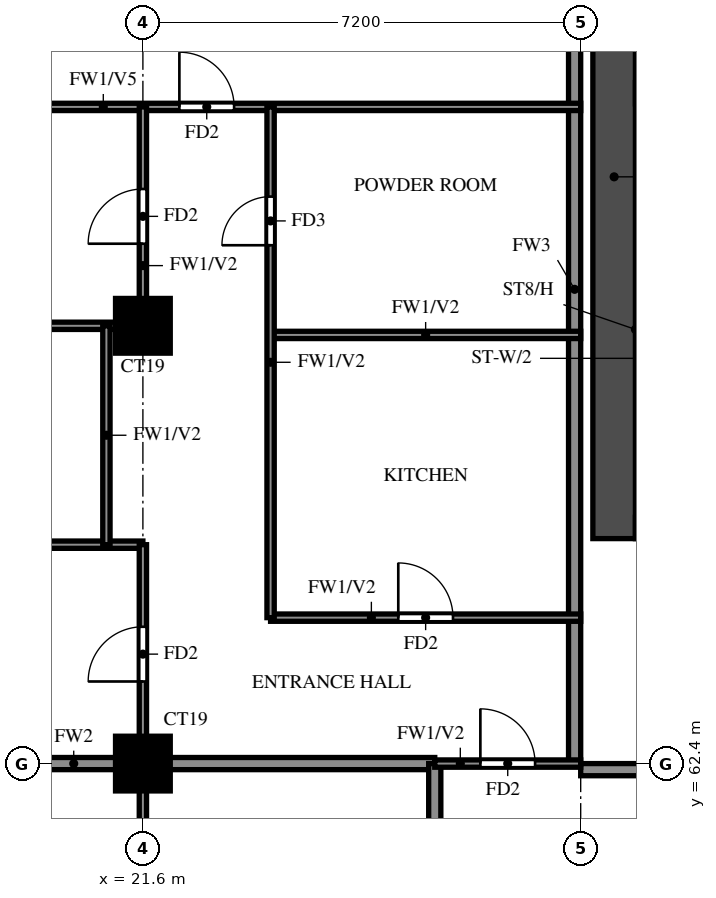
"""IFC4 building model, lengths in metres.
Left out: names, types, materials, properties, quantities, classifications, styles, units other than length and angle.
Written with IfcOpenShell. Run it as: python <this file> out.ifc"""

import sys

from ifc_helpers import new_model, si_unit, direction, frame, frame_2d, origin, origin_2d, place, context, subcontext, project, spatial, rectangle, extrude, source, transform, mapped, element, fill, save


model = new_model("IFC4")
c1 = context("Model", 3, precision=1e-05, world=origin(), true_north=direction((0.0, 1.0)))
c2 = subcontext(c1, "Body", "Model", "MODEL_VIEW")
j1 = project(units=[si_unit("LENGTHUNIT", "METRE"), si_unit("PLANEANGLEUNIT", "RADIAN")], contexts=[c1])
p1 = place(None, origin())
s1 = spatial("IfcSite", under=j1, at=p1, CompositionType="ELEMENT")
p2 = place(p1, origin())
s2 = spatial("IfcBuilding", under=s1, at=p2, CompositionType="ELEMENT")
p3 = place(p2, frame((0.0, 0.0, 199.0)))
s3 = spatial("IfcBuildingStorey", under=s2, at=p3, CompositionType="ELEMENT", Elevation=199.0)
m1 = source(origin(), c2, "Body", "SweptSolid", [
    extrude(rectangle(XDim=0.9, YDim=0.9, at=origin_2d()), origin(), (0.0, 0.0, 1.0), 3.2),
])
for number, where, z_axis, x_axis in (
    (1, (21.6, 62.4, 0.0), (0.0, 0.0, 1.0), (1.0, 0.0, 0.0)),
    (2, (21.6, 69.6, 0.0), (0.0, 0.0, 1.0), (1.0, 0.0, 0.0)),
):
    element("IfcColumn", number, at=place(p3, frame(where, z_axis=z_axis, x_axis=x_axis)), inside=s3, PredefinedType="COLUMN", context=c2, shape_type="MappedRepresentation", body=[
        mapped(m1, transform((0.0, 0.0, 0.0))),
    ])
p4 = place(p3, frame((29.35, 66.1, 0.0), z_axis=(0.0, 0.0, 1.0), x_axis=(0.0, 1.0, 0.0)))
e3 = element("IfcWall", 3, at=p4, inside=s3, PredefinedType="SHEAR", context=c2, shape_type="SweptSolid", body=[
    extrude(rectangle(XDim=11.9, YDim=0.7, at=frame_2d((5.95, 0.0))), origin(), (0.0, 0.0, 1.0), 3.2),
])
p5 = place(p3, frame((28.8, 62.3, 0.0), z_axis=(0.0, 0.0, 1.0), x_axis=(1.0, 0.0, 0.0)))
e4 = element("IfcWall", 4, at=p5, inside=s3, PredefinedType="SOLIDWALL", context=c2, shape_type="SweptSolid", body=[
    extrude(rectangle(XDim=4.8, YDim=0.2, at=frame_2d((2.4, 0.0))), origin(), (0.0, 0.0, 1.0), 3.2),
])
p6 = place(p3, frame((28.7, 62.4, 0.0), z_axis=(0.0, 0.0, 1.0), x_axis=(0.0, 1.0, 0.0)))
e5 = element("IfcWall", 5, at=p6, inside=s3, PredefinedType="SOLIDWALL", context=c2, shape_type="SweptSolid", body=[
    extrude(rectangle(XDim=15.6, YDim=0.2, at=frame_2d((7.8, 0.0))), origin(), (0.0, 0.0, 1.0), 3.2),
])
p7 = place(p3, frame((14.525, 62.4, 0.0), z_axis=(0.0, 0.0, 1.0), x_axis=(1.0, 0.0, 0.0)))
e6 = element("IfcWall", 6, at=p7, inside=s3, PredefinedType="SOLIDWALL", context=c2, shape_type="SweptSolid", body=[
    extrude(rectangle(XDim=11.875, YDim=0.2, at=frame_2d((5.938, 0.0))), origin(), (0.0, 0.0, 1.0), 3.2),
])
p8 = place(p3, frame((26.4, 60.0, 0.0), z_axis=(0.0, 0.0, 1.0), x_axis=(0.0, 1.0, 0.0)))
e7 = element("IfcWall", 7, at=p8, inside=s3, PredefinedType="SOLIDWALL", context=c2, shape_type="SweptSolid", body=[
    extrude(rectangle(XDim=2.4, YDim=0.2, at=frame_2d((1.2, 0.0))), origin(), (0.0, 0.0, 1.0), 3.2),
])
p9 = place(p3, frame((26.4, 62.4, 0.0), z_axis=(0.0, 0.0, 1.0), x_axis=(1.0, 0.0, 0.0)))
e8 = element("IfcWall", 8, at=p9, inside=s3, PredefinedType="PARTITIONING", context=c2, shape_type="SweptSolid", body=[
    extrude(rectangle(XDim=2.4, YDim=0.12, at=frame_2d((1.2, 0.0))), origin(), (0.0, 0.0, 1.0), 3.2),
])
p10 = place(p9, frame((0.75, 0.0, 0.0)))
e9 = element("IfcOpeningElement", 9, at=p10, cuts=e8, PredefinedType="OPENING", context=c2, shape_type="SweptSolid", body=[
    extrude(rectangle(XDim=0.9, YDim=2.1, at=frame_2d((0.45, 1.05))), frame((0.0, 0.07, 0.0), z_axis=(0.0, -1.0, 0.0), x_axis=(1.0, 0.0, 0.0)), (0.0, 0.0, 1.0), 0.14),
])
p11 = place(p3, frame((23.7, 64.8, 0.0), z_axis=(0.0, 0.0, 1.0), x_axis=(1.0, 0.0, 0.0)))
e10 = element("IfcWall", 10, at=p11, inside=s3, PredefinedType="PARTITIONING", context=c2, shape_type="SweptSolid", body=[
    extrude(rectangle(XDim=5.1, YDim=0.12, at=frame_2d((2.55, 0.0))), origin(), (0.0, 0.0, 1.0), 3.2),
])
p12 = place(p11, frame((2.1, 0.0, 0.0)))
e11 = element("IfcOpeningElement", 11, at=p12, cuts=e10, PredefinedType="OPENING", context=c2, shape_type="SweptSolid", body=[
    extrude(rectangle(XDim=0.9, YDim=2.1, at=frame_2d((0.45, 1.05))), frame((0.0, 0.07, 0.0), z_axis=(0.0, -1.0, 0.0), x_axis=(1.0, 0.0, 0.0)), (0.0, 0.0, 1.0), 0.14),
])
p13 = place(p3, frame((14.525, 66.0, 0.0), z_axis=(0.0, 0.0, 1.0), x_axis=(1.0, 0.0, 0.0)))
e12 = element("IfcWall", 12, at=p13, inside=s3, PredefinedType="PARTITIONING", context=c2, shape_type="SweptSolid", body=[
    extrude(rectangle(XDim=7.075, YDim=0.12, at=frame_2d((3.538, 0.0))), origin(), (0.0, 0.0, 1.0), 2.3),
])
p14 = place(p13, frame((2.837, 0.0, 0.0)))
e13 = element("IfcOpeningElement", 13, at=p14, cuts=e12, PredefinedType="OPENING", context=c2, shape_type="SweptSolid", body=[
    extrude(rectangle(XDim=0.8, YDim=2.1, at=frame_2d((0.4, 1.05))), frame((0.0, 0.07, 0.0), z_axis=(0.0, -1.0, 0.0), x_axis=(1.0, 0.0, 0.0)), (0.0, 0.0, 1.0), 0.14),
])
p15 = place(p3, frame((23.7, 69.45, 0.0), z_axis=(0.0, 0.0, 1.0), x_axis=(1.0, 0.0, 0.0)))
e14 = element("IfcWall", 14, at=p15, inside=s3, PredefinedType="PARTITIONING", context=c2, shape_type="SweptSolid", body=[
    extrude(rectangle(XDim=5.1, YDim=0.12, at=frame_2d((2.55, 0.0))), origin(), (0.0, 0.0, 1.0), 3.2),
])
p16 = place(p3, frame((14.525, 69.6, 0.0), z_axis=(0.0, 0.0, 1.0), x_axis=(1.0, 0.0, 0.0)))
e15 = element("IfcWall", 15, at=p16, inside=s3, PredefinedType="PARTITIONING", context=c2, shape_type="SweptSolid", body=[
    extrude(rectangle(XDim=7.075, YDim=0.12, at=frame_2d((3.538, 0.0))), origin(), (0.0, 0.0, 1.0), 3.2),
])
p17 = place(p3, frame((14.525, 73.2, 0.0), z_axis=(0.0, 0.0, 1.0), x_axis=(1.0, 0.0, 0.0)))
e16 = element("IfcWall", 16, at=p17, inside=s3, PredefinedType="PARTITIONING", context=c2, shape_type="SweptSolid", body=[
    extrude(rectangle(XDim=14.275, YDim=0.12, at=frame_2d((7.138, 0.0))), origin(), (0.0, 0.0, 1.0), 2.3),
])
p18 = place(p17, frame((7.675, 0.0, 0.0)))
e17 = element("IfcOpeningElement", 17, at=p18, cuts=e16, PredefinedType="OPENING", context=c2, shape_type="SweptSolid", body=[
    extrude(rectangle(XDim=0.9, YDim=2.1, at=frame_2d((0.45, 1.05))), frame((0.0, 0.07, 0.0), z_axis=(0.0, -1.0, 0.0), x_axis=(1.0, 0.0, 0.0)), (0.0, 0.0, 1.0), 0.14),
])
p19 = place(p3, frame((21.0, 66.0, 0.0), z_axis=(0.0, 0.0, 1.0), x_axis=(0.0, 1.0, 0.0)))
e18 = element("IfcWall", 18, at=p19, inside=s3, PredefinedType="PARTITIONING", context=c2, shape_type="SweptSolid", body=[
    extrude(rectangle(XDim=3.6, YDim=0.12, at=frame_2d((1.8, 0.0))), origin(), (0.0, 0.0, 1.0), 3.2),
])
p20 = place(p3, frame((21.6, 48.0, 0.0), z_axis=(0.0, 0.0, 1.0), x_axis=(0.0, 1.0, 0.0)))
e19 = element("IfcWall", 19, at=p20, inside=s3, PredefinedType="PARTITIONING", context=c2, shape_type="SweptSolid", body=[
    extrude(rectangle(XDim=18.0, YDim=0.12, at=frame_2d((9.0, 0.0))), origin(), (0.0, 0.0, 1.0), 3.2),
])
p21 = place(p20, frame((1.35, 0.0, 0.0)))
e20 = element("IfcOpeningElement", 20, at=p21, cuts=e19, PredefinedType="OPENING", context=c2, shape_type="SweptSolid", body=[
    extrude(rectangle(XDim=0.9, YDim=2.1, at=frame_2d((0.45, 1.05))), frame((0.0, 0.07, 0.0), z_axis=(0.0, -1.0, 0.0), x_axis=(1.0, 0.0, 0.0)), (0.0, 0.0, 1.0), 0.14),
])
p22 = place(p20, frame((7.95, 0.0, 0.0)))
e21 = element("IfcOpeningElement", 21, at=p22, cuts=e19, PredefinedType="OPENING", context=c2, shape_type="SweptSolid", body=[
    extrude(rectangle(XDim=1.5, YDim=2.1, at=frame_2d((0.75, 1.05))), frame((0.0, 0.07, 0.0), z_axis=(0.0, -1.0, 0.0), x_axis=(1.0, 0.0, 0.0)), (0.0, 0.0, 1.0), 0.14),
])
p23 = place(p20, frame((12.15, 0.0, 0.0)))
e22 = element("IfcOpeningElement", 22, at=p23, cuts=e19, PredefinedType="OPENING", context=c2, shape_type="SweptSolid", body=[
    extrude(rectangle(XDim=0.9, YDim=2.1, at=frame_2d((0.45, 1.05))), frame((0.0, 0.07, 0.0), z_axis=(0.0, -1.0, 0.0), x_axis=(1.0, 0.0, 0.0)), (0.0, 0.0, 1.0), 0.14),
])
p24 = place(p20, frame((15.75, 0.0, 0.0)))
e23 = element("IfcOpeningElement", 23, at=p24, cuts=e19, PredefinedType="OPENING", context=c2, shape_type="SweptSolid", body=[
    extrude(rectangle(XDim=0.9, YDim=2.1, at=frame_2d((0.45, 1.05))), frame((0.0, 0.07, 0.0), z_axis=(0.0, -1.0, 0.0), x_axis=(1.0, 0.0, 0.0)), (0.0, 0.0, 1.0), 0.14),
])
p25 = place(p3, frame((21.6, 69.6, 0.0), z_axis=(0.0, 0.0, 1.0), x_axis=(0.0, 1.0, 0.0)))
e24 = element("IfcWall", 24, at=p25, inside=s3, PredefinedType="PARTITIONING", context=c2, shape_type="SweptSolid", body=[
    extrude(rectangle(XDim=3.6, YDim=0.12, at=frame_2d((1.8, 0.0))), origin(), (0.0, 0.0, 1.0), 3.2),
])
p26 = place(p25, frame((1.35, 0.0, 0.0)))
e25 = element("IfcOpeningElement", 25, at=p26, cuts=e24, PredefinedType="OPENING", context=c2, shape_type="SweptSolid", body=[
    extrude(rectangle(XDim=0.9, YDim=2.1, at=frame_2d((0.45, 1.05))), frame((0.0, 0.07, 0.0), z_axis=(0.0, -1.0, 0.0), x_axis=(1.0, 0.0, 0.0)), (0.0, 0.0, 1.0), 0.14),
])
p27 = place(p3, frame((23.7, 64.8, 0.0), z_axis=(0.0, 0.0, 1.0), x_axis=(0.0, 1.0, 0.0)))
e26 = element("IfcWall", 26, at=p27, inside=s3, PredefinedType="PARTITIONING", context=c2, shape_type="SweptSolid", body=[
    extrude(rectangle(XDim=8.4, YDim=0.12, at=frame_2d((4.2, 0.0))), origin(), (0.0, 0.0, 1.0), 3.2),
])
p28 = place(p27, frame((6.125, 0.0, 0.0)))
e27 = element("IfcOpeningElement", 27, at=p28, cuts=e26, PredefinedType="OPENING", context=c2, shape_type="SweptSolid", body=[
    extrude(rectangle(XDim=0.8, YDim=2.1, at=frame_2d((0.4, 1.05))), frame((0.0, 0.07, 0.0), z_axis=(0.0, -1.0, 0.0), x_axis=(1.0, 0.0, 0.0)), (0.0, 0.0, 1.0), 0.14),
])
p29 = place(p10, origin())
e28 = element("IfcDoor", 28, at=p29, inside=s3, OperationType="SINGLE_SWING_LEFT", PredefinedType="DOOR", context=c2, shape_type="SweptSolid", body=[
    extrude(rectangle(XDim=0.9, YDim=2.1, at=frame_2d((0.45, 1.05))), frame((0.0, 0.025, 0.0), z_axis=(0.0, -1.0, 0.0), x_axis=(1.0, 0.0, 0.0)), (0.0, 0.0, 1.0), 0.05),
])
fill(e9, e28)
p30 = place(p24, origin())
e29 = element("IfcDoor", 29, at=p30, inside=s3, OperationType="SINGLE_SWING_RIGHT", PredefinedType="DOOR", context=c2, shape_type="SweptSolid", body=[
    extrude(rectangle(XDim=0.9, YDim=2.1, at=frame_2d((0.45, 1.05))), frame((0.0, 0.025, 0.0), z_axis=(0.0, -1.0, 0.0), x_axis=(1.0, 0.0, 0.0)), (0.0, 0.0, 1.0), 0.05),
])
fill(e23, e29)
p31 = place(p26, origin())
e30 = element("IfcDoor", 30, at=p31, inside=s3, OperationType="SINGLE_SWING_LEFT", PredefinedType="DOOR", context=c2, shape_type="SweptSolid", body=[
    extrude(rectangle(XDim=0.9, YDim=2.1, at=frame_2d((0.45, 1.05))), frame((0.0, 0.025, 0.0), z_axis=(0.0, -1.0, 0.0), x_axis=(1.0, 0.0, 0.0)), (0.0, 0.0, 1.0), 0.05),
])
fill(e25, e30)
p32 = place(p18, origin())
e31 = element("IfcDoor", 31, at=p32, inside=s3, OperationType="SINGLE_SWING_RIGHT", PredefinedType="DOOR", context=c2, shape_type="SweptSolid", body=[
    extrude(rectangle(XDim=0.9, YDim=2.1, at=frame_2d((0.45, 1.05))), frame((0.0, 0.025, 0.0), z_axis=(0.0, -1.0, 0.0), x_axis=(1.0, 0.0, 0.0)), (0.0, 0.0, 1.0), 0.05),
])
fill(e17, e31)
p33 = place(p12, origin())
e32 = element("IfcDoor", 32, at=p33, inside=s3, OperationType="SINGLE_SWING_LEFT", PredefinedType="DOOR", context=c2, shape_type="SweptSolid", body=[
    extrude(rectangle(XDim=0.9, YDim=2.1, at=frame_2d((0.45, 1.05))), frame((0.0, 0.025, 0.0), z_axis=(0.0, -1.0, 0.0), x_axis=(1.0, 0.0, 0.0)), (0.0, 0.0, 1.0), 0.05),
])
fill(e11, e32)
p34 = place(p28, origin())
e33 = element("IfcDoor", 33, at=p34, inside=s3, OperationType="SINGLE_SWING_LEFT", PredefinedType="DOOR", context=c2, shape_type="SweptSolid", body=[
    extrude(rectangle(XDim=0.8, YDim=2.1, at=frame_2d((0.4, 1.05))), frame((0.0, 0.025, 0.0), z_axis=(0.0, -1.0, 0.0), x_axis=(1.0, 0.0, 0.0)), (0.0, 0.0, 1.0), 0.05),
])
fill(e27, e33)
save(model, sys.argv[1])
